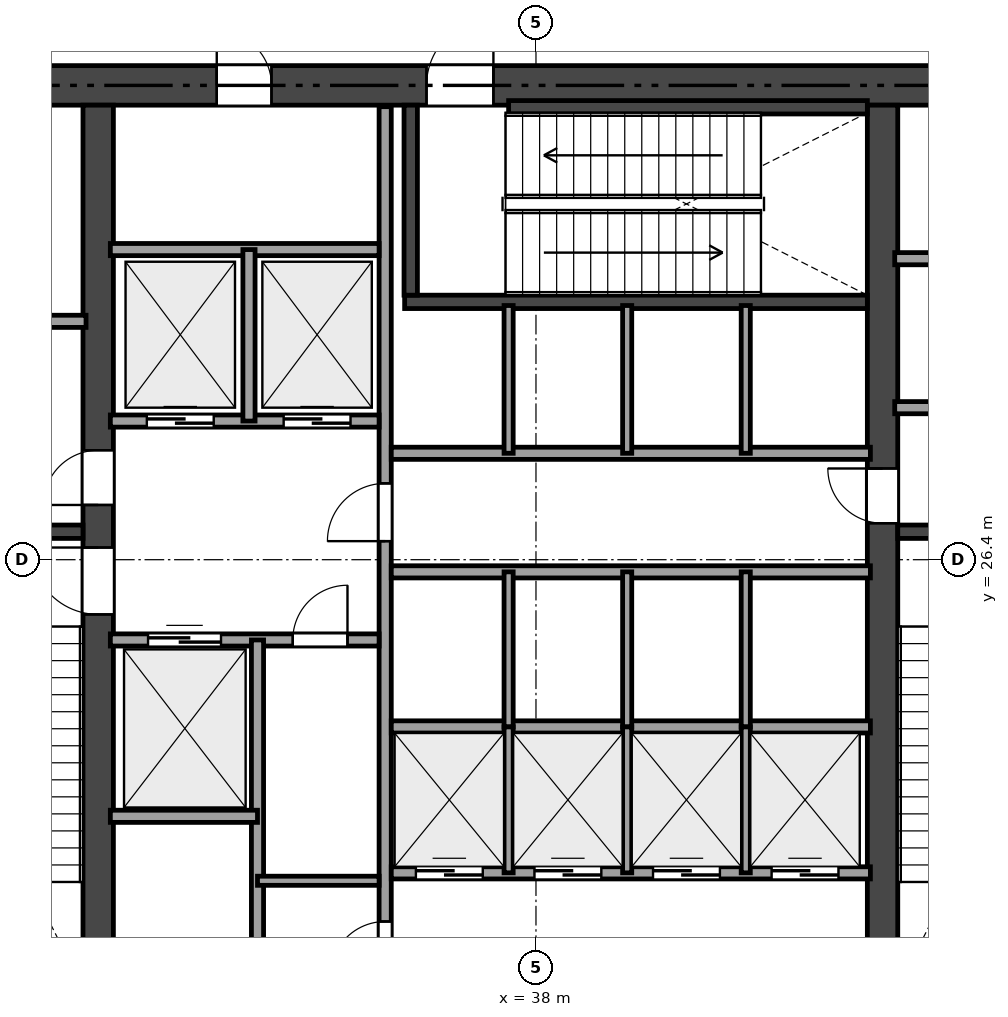
"""IFC4 building model, lengths in metres.
Left out: names, types, materials, properties, quantities, classifications, styles, units other than length and angle.
Written with IfcOpenShell. Run it as: python <this file> out.ifc"""

import sys

from ifc_helpers import new_model, si_unit, direction, frame, frame_2d, origin, place, context, subcontext, project, spatial, rectangle, extrude, element, fill, save


model = new_model("IFC4")
c1 = context("Model", 3, precision=1e-05, world=origin(), true_north=direction((0.0, 1.0)))
c2 = subcontext(c1, "Body", "Model", "MODEL_VIEW")
j1 = project(units=[si_unit("LENGTHUNIT", "METRE"), si_unit("PLANEANGLEUNIT", "RADIAN")], contexts=[c1])
p1 = place(None, origin())
s1 = spatial("IfcSite", under=j1, at=p1, CompositionType="ELEMENT")
p2 = place(p1, origin())
s2 = spatial("IfcBuilding", under=s1, at=p2, CompositionType="ELEMENT")
p3 = place(p2, frame((0.0, 0.0, 5.4)))
s3 = spatial("IfcBuildingStorey", under=s2, at=p3, CompositionType="ELEMENT", Elevation=5.4)
p4 = place(p3, frame((26.475, 34.2, 0.0), z_axis=(0.0, 0.0, 1.0), x_axis=(1.0, 0.0, 0.0)))
e1 = element("IfcWall", 1, at=p4, inside=s3, PredefinedType="SHEAR", context=c2, shape_type="SweptSolid", body=[
    extrude(rectangle(XDim=21.45, YDim=0.65, at=frame_2d((10.725, 0.0))), origin(), (0.0, 0.0, 1.0), 5.05),
])
p5 = place(p4, frame((9.725, 0.0, 0.0)))
e2 = element("IfcOpeningElement", 2, at=p5, cuts=e1, PredefinedType="OPENING", context=c2, shape_type="SweptSolid", body=[
    extrude(rectangle(XDim=1.1, YDim=2.15, at=frame_2d((0.55, 1.075))), frame((0.0, 0.335, 0.0), z_axis=(0.0, -1.0, 0.0), x_axis=(1.0, 0.0, 0.0)), (0.0, 0.0, 1.0), 0.67),
])
p6 = place(p4, frame((1.975, 0.0, 0.0)))
e3 = element("IfcOpeningElement", 3, at=p6, cuts=e1, PredefinedType="OPENING", context=c2, shape_type="SweptSolid", body=[
    extrude(rectangle(XDim=0.9, YDim=2.1, at=frame_2d((0.45, 1.05))), frame((0.0, 0.335, 0.0), z_axis=(0.0, -1.0, 0.0), x_axis=(1.0, 0.0, 0.0)), (0.0, 0.0, 1.0), 0.67),
])
p7 = place(p4, frame((6.275, 0.0, 0.0)))
e4 = element("IfcOpeningElement", 4, at=p7, cuts=e1, PredefinedType="OPENING", context=c2, shape_type="SweptSolid", body=[
    extrude(rectangle(XDim=0.9, YDim=2.1, at=frame_2d((0.45, 1.05))), frame((0.0, 0.335, 0.0), z_axis=(0.0, -1.0, 0.0), x_axis=(1.0, 0.0, 0.0)), (0.0, 0.0, 1.0), 0.67),
])
p8 = place(p3, frame((30.8, 18.925, 0.0), z_axis=(0.0, 0.0, 1.0), x_axis=(0.0, 1.0, 0.0)))
e5 = element("IfcWall", 5, at=p8, inside=s3, PredefinedType="SHEAR", context=c2, shape_type="SweptSolid", body=[
    extrude(rectangle(XDim=14.95, YDim=0.5, at=frame_2d((7.475, 0.0))), origin(), (0.0, 0.0, 1.0), 5.05),
])
p9 = place(p8, frame((6.575, 0.0, 0.0)))
e6 = element("IfcOpeningElement", 6, at=p9, cuts=e5, PredefinedType="OPENING", context=c2, shape_type="SweptSolid", body=[
    extrude(rectangle(XDim=1.1, YDim=2.15, at=frame_2d((0.55, 1.075))), frame((0.0, 0.26, 0.0), z_axis=(0.0, -1.0, 0.0), x_axis=(1.0, 0.0, 0.0)), (0.0, 0.0, 1.0), 0.52),
])
p10 = place(p8, frame((8.375, 0.0, 0.0)))
e7 = element("IfcOpeningElement", 7, at=p10, cuts=e5, PredefinedType="OPENING", context=c2, shape_type="SweptSolid", body=[
    extrude(rectangle(XDim=0.9, YDim=2.1, at=frame_2d((0.45, 1.05))), frame((0.0, 0.26, 0.0), z_axis=(0.0, -1.0, 0.0), x_axis=(1.0, 0.0, 0.0)), (0.0, 0.0, 1.0), 0.52),
])
p11 = place(p3, frame((43.7, 18.925, 0.0), z_axis=(0.0, 0.0, 1.0), x_axis=(0.0, 1.0, 0.0)))
e8 = element("IfcWall", 8, at=p11, inside=s3, PredefinedType="SHEAR", context=c2, shape_type="SweptSolid", body=[
    extrude(rectangle(XDim=14.95, YDim=0.5, at=frame_2d((7.475, 0.0))), origin(), (0.0, 0.0, 1.0), 5.05),
])
p12 = place(p11, frame((8.075, 0.0, 0.0)))
e9 = element("IfcOpeningElement", 9, at=p12, cuts=e8, PredefinedType="OPENING", context=c2, shape_type="SweptSolid", body=[
    extrude(rectangle(XDim=0.9, YDim=2.1, at=frame_2d((0.45, 1.05))), frame((0.0, 0.26, 0.0), z_axis=(0.0, -1.0, 0.0), x_axis=(1.0, 0.0, 0.0)), (0.0, 0.0, 1.0), 0.52),
])
p13 = place(p3, frame((27.125, 26.86, 0.0), z_axis=(0.0, 0.0, 1.0), x_axis=(1.0, 0.0, 0.0)))
e10 = element("IfcWall", 10, at=p13, inside=s3, PredefinedType="SHEAR", context=c2, shape_type="SweptSolid", body=[
    extrude(rectangle(XDim=3.425, YDim=0.22, at=frame_2d((1.712, 0.0))), origin(), (0.0, 0.0, 1.0), 5.05),
])
p14 = place(p3, frame((43.95, 26.86, 0.0), z_axis=(0.0, 0.0, 1.0), x_axis=(1.0, 0.0, 0.0)))
e11 = element("IfcWall", 11, at=p14, inside=s3, PredefinedType="SHEAR", context=c2, shape_type="SweptSolid", body=[
    extrude(rectangle(XDim=3.325, YDim=0.22, at=frame_2d((1.663, 0.0))), origin(), (0.0, 0.0, 1.0), 5.05),
])
p15 = place(p3, frame((35.84, 30.64, 0.0), z_axis=(0.0, 0.0, 1.0), x_axis=(1.0, 0.0, 0.0)))
e12 = element("IfcWall", 12, at=p15, inside=s3, PredefinedType="SHEAR", context=c2, shape_type="SweptSolid", body=[
    extrude(rectangle(XDim=7.61, YDim=0.22, at=frame_2d((3.805, 0.0))), origin(), (0.0, 0.0, 1.0), 5.05),
])
p16 = place(p3, frame((35.94, 30.75, 0.0), z_axis=(0.0, 0.0, 1.0), x_axis=(0.0, 1.0, 0.0)))
e13 = element("IfcWall", 13, at=p16, inside=s3, PredefinedType="SHEAR", context=c2, shape_type="SweptSolid", body=[
    extrude(rectangle(XDim=3.125, YDim=0.22, at=frame_2d((1.562, 0.0))), origin(), (0.0, 0.0, 1.0), 5.05),
])
p17 = place(p3, frame((37.55, 33.84, 0.0), z_axis=(0.0, 0.0, 1.0), x_axis=(1.0, 0.0, 0.0)))
e14 = element("IfcWall", 14, at=p17, inside=s3, PredefinedType="SHEAR", context=c2, shape_type="SweptSolid", body=[
    extrude(rectangle(XDim=5.9, YDim=0.22, at=frame_2d((2.95, 0.0))), origin(), (0.0, 0.0, 1.0), 5.05),
])
p18 = place(p3, frame((27.15, 30.32, 0.0), z_axis=(0.0, 0.0, 1.0), x_axis=(1.0, 0.0, 0.0)))
e15 = element("IfcWall", 15, at=p18, inside=s3, PredefinedType="SOLIDWALL", context=c2, shape_type="SweptSolid", body=[
    extrude(rectangle(XDim=3.45, YDim=0.2, at=frame_2d((1.725, 0.0))), origin(), (0.0, 0.0, 1.0), 5.05),
])
p19 = place(p3, frame((43.9, 28.9, 0.0), z_axis=(0.0, 0.0, 1.0), x_axis=(1.0, 0.0, 0.0)))
e16 = element("IfcWall", 16, at=p19, inside=s3, PredefinedType="SOLIDWALL", context=c2, shape_type="SweptSolid", body=[
    extrude(rectangle(XDim=3.35, YDim=0.2, at=frame_2d((1.675, 0.0))), origin(), (0.0, 0.0, 1.0), 5.05),
])
p20 = place(p19, frame((1.15, 0.0, 0.0)))
e17 = element("IfcOpeningElement", 17, at=p20, cuts=e16, PredefinedType="OPENING", context=c2, shape_type="SweptSolid", body=[
    extrude(rectangle(XDim=0.9, YDim=2.1, at=frame_2d((0.45, 1.05))), frame((0.0, 0.11, 0.0), z_axis=(0.0, -1.0, 0.0), x_axis=(1.0, 0.0, 0.0)), (0.0, 0.0, 1.0), 0.22),
])
p21 = place(p3, frame((43.9, 31.35, 0.0), z_axis=(0.0, 0.0, 1.0), x_axis=(1.0, 0.0, 0.0)))
e18 = element("IfcWall", 18, at=p21, inside=s3, PredefinedType="SOLIDWALL", context=c2, shape_type="SweptSolid", body=[
    extrude(rectangle(XDim=3.35, YDim=0.2, at=frame_2d((1.675, 0.0))), origin(), (0.0, 0.0, 1.0), 5.05),
])
p22 = place(p3, frame((35.52, 18.95, 0.0), z_axis=(0.0, 0.0, 1.0), x_axis=(0.0, 1.0, 0.0)))
e19 = element("IfcWall", 19, at=p22, inside=s3, PredefinedType="SOLIDWALL", context=c2, shape_type="SweptSolid", body=[
    extrude(rectangle(XDim=14.9, YDim=0.2, at=frame_2d((7.45, 0.0))), origin(), (0.0, 0.0, 1.0), 4.571),
])
p23 = place(p22, frame((7.755, 0.0, 0.0)))
e20 = element("IfcOpeningElement", 20, at=p23, cuts=e19, PredefinedType="OPENING", context=c2, shape_type="SweptSolid", body=[
    extrude(rectangle(XDim=0.95, YDim=2.15, at=frame_2d((0.475, 1.075))), frame((0.0, 0.11, 0.0), z_axis=(0.0, -1.0, 0.0), x_axis=(1.0, 0.0, 0.0)), (0.0, 0.0, 1.0), 0.22),
])
p24 = place(p22, frame((0.6, 0.0, 0.0)))
e21 = element("IfcOpeningElement", 21, at=p24, cuts=e19, PredefinedType="OPENING", context=c2, shape_type="SweptSolid", body=[
    extrude(rectangle(XDim=0.9, YDim=2.1, at=frame_2d((0.45, 1.05))), frame((0.0, 0.11, 0.0), z_axis=(0.0, -1.0, 0.0), x_axis=(1.0, 0.0, 0.0)), (0.0, 0.0, 1.0), 0.22),
])
p25 = place(p3, frame((31.0, 28.68, 0.0), z_axis=(0.0, 0.0, 1.0), x_axis=(1.0, 0.0, 0.0)))
e22 = element("IfcWall", 22, at=p25, inside=s3, PredefinedType="SOLIDWALL", context=c2, shape_type="SweptSolid", body=[
    extrude(rectangle(XDim=4.42, YDim=0.2, at=frame_2d((2.21, 0.0))), origin(), (0.0, 0.0, 1.0), 5.05),
])
p26 = place(p25, frame((0.6, 0.0, 0.0)))
e23 = element("IfcOpeningElement", 23, at=p26, cuts=e22, PredefinedType="OPENING", context=c2, shape_type="SweptSolid", body=[
    extrude(rectangle(XDim=1.1, YDim=2.15, at=frame_2d((0.55, 1.075))), frame((0.0, 0.11, 0.0), z_axis=(0.0, -1.0, 0.0), x_axis=(1.0, 0.0, 0.0)), (0.0, 0.0, 1.0), 0.22),
])
p27 = place(p25, frame((2.85, 0.0, 0.0)))
e24 = element("IfcOpeningElement", 24, at=p27, cuts=e22, PredefinedType="OPENING", context=c2, shape_type="SweptSolid", body=[
    extrude(rectangle(XDim=1.1, YDim=2.15, at=frame_2d((0.55, 1.075))), frame((0.0, 0.11, 0.0), z_axis=(0.0, -1.0, 0.0), x_axis=(1.0, 0.0, 0.0)), (0.0, 0.0, 1.0), 0.22),
])
p28 = place(p3, frame((31.0, 31.5, 0.0), z_axis=(0.0, 0.0, 1.0), x_axis=(1.0, 0.0, 0.0)))
e25 = element("IfcWall", 25, at=p28, inside=s3, PredefinedType="SOLIDWALL", context=c2, shape_type="SweptSolid", body=[
    extrude(rectangle(XDim=4.42, YDim=0.2, at=frame_2d((2.21, 0.0))), origin(), (0.0, 0.0, 1.0), 5.05),
])
p29 = place(p3, frame((33.28, 28.68, 0.0), z_axis=(0.0, 0.0, 1.0), x_axis=(0.0, 1.0, 0.0)))
e26 = element("IfcWall", 26, at=p29, inside=s3, PredefinedType="SOLIDWALL", context=c2, shape_type="SweptSolid", body=[
    extrude(rectangle(XDim=2.82, YDim=0.2, at=frame_2d((1.41, 0.0))), origin(), (0.0, 0.0, 1.0), 5.05),
])
p30 = place(p3, frame((31.0, 25.08, 0.0), z_axis=(0.0, 0.0, 1.0), x_axis=(1.0, 0.0, 0.0)))
e27 = element("IfcWall", 27, at=p30, inside=s3, PredefinedType="SOLIDWALL", context=c2, shape_type="SweptSolid", body=[
    extrude(rectangle(XDim=4.42, YDim=0.2, at=frame_2d((2.21, 0.0))), origin(), (0.0, 0.0, 1.0), 5.05),
])
p31 = place(p30, frame((3.0, 0.0, 0.0)))
e28 = element("IfcOpeningElement", 28, at=p31, cuts=e27, PredefinedType="OPENING", context=c2, shape_type="SweptSolid", body=[
    extrude(rectangle(XDim=0.9, YDim=2.1, at=frame_2d((0.45, 1.05))), frame((0.0, 0.11, 0.0), z_axis=(0.0, -1.0, 0.0), x_axis=(1.0, 0.0, 0.0)), (0.0, 0.0, 1.0), 0.22),
])
p32 = place(p30, frame((0.62, 0.0, 0.0)))
e29 = element("IfcOpeningElement", 29, at=p32, cuts=e27, PredefinedType="OPENING", context=c2, shape_type="SweptSolid", body=[
    extrude(rectangle(XDim=1.2, YDim=2.15, at=frame_2d((0.6, 1.075))), frame((0.0, 0.11, 0.0), z_axis=(0.0, -1.0, 0.0), x_axis=(1.0, 0.0, 0.0)), (0.0, 0.0, 1.0), 0.22),
])
p33 = place(p3, frame((33.42, 18.95, 0.0), z_axis=(0.0, 0.0, 1.0), x_axis=(0.0, 1.0, 0.0)))
e30 = element("IfcWall", 30, at=p33, inside=s3, PredefinedType="SOLIDWALL", context=c2, shape_type="SweptSolid", body=[
    extrude(rectangle(XDim=6.13, YDim=0.2, at=frame_2d((3.065, 0.0))), origin(), (0.0, 0.0, 1.0), 4.571),
])
p34 = place(p3, frame((31.0, 22.18, 0.0), z_axis=(0.0, 0.0, 1.0), x_axis=(1.0, 0.0, 0.0)))
e31 = element("IfcWall", 31, at=p34, inside=s3, PredefinedType="SOLIDWALL", context=c2, shape_type="SweptSolid", body=[
    extrude(rectangle(XDim=2.42, YDim=0.2, at=frame_2d((1.21, 0.0))), origin(), (0.0, 0.0, 1.0), 5.05),
])
p35 = place(p3, frame((33.42, 21.12, 0.0), z_axis=(0.0, 0.0, 1.0), x_axis=(1.0, 0.0, 0.0)))
e32 = element("IfcWall", 32, at=p35, inside=s3, PredefinedType="PARTITIONING", context=c2, shape_type="SweptSolid", body=[
    extrude(rectangle(XDim=2.0, YDim=0.15, at=frame_2d((1.0, 0.0))), origin(), (0.0, 0.0, 1.0), 5.05),
])
for number, where, z_axis, x_axis in (
    (33, (35.62, 28.15, 0.0), (0.0, 0.0, 1.0), (1.0, 0.0, 0.0)),
    (34, (35.62, 26.2, 0.0), (0.0, 0.0, 1.0), (1.0, 0.0, 0.0)),
):
    element("IfcWall", number, at=place(p3, frame(where, z_axis=z_axis, x_axis=x_axis)), inside=s3, PredefinedType="SOLIDWALL", context=c2, shape_type="SweptSolid", body=[
        extrude(rectangle(XDim=7.88, YDim=0.2, at=frame_2d((3.94, 0.0))), origin(), (0.0, 0.0, 1.0), 5.05),
    ])
p36 = place(p3, frame((35.62, 23.65, 0.0), z_axis=(0.0, 0.0, 1.0), x_axis=(1.0, 0.0, 0.0)))
e35 = element("IfcWall", 35, at=p36, inside=s3, PredefinedType="SOLIDWALL", context=c2, shape_type="SweptSolid", body=[
    extrude(rectangle(XDim=7.88, YDim=0.2, at=frame_2d((3.94, 0.0))), origin(), (0.0, 0.0, 1.0), 4.571),
])
p37 = place(p3, frame((35.62, 21.25, 0.0), z_axis=(0.0, 0.0, 1.0), x_axis=(1.0, 0.0, 0.0)))
e36 = element("IfcWall", 36, at=p37, inside=s3, PredefinedType="SOLIDWALL", context=c2, shape_type="SweptSolid", body=[
    extrude(rectangle(XDim=7.88, YDim=0.2, at=frame_2d((3.94, 0.0))), origin(), (0.0, 0.0, 1.0), 5.05),
])
p38 = place(p37, frame((0.405, 0.0, 0.0)))
e37 = element("IfcOpeningElement", 37, at=p38, cuts=e36, PredefinedType="OPENING", context=c2, shape_type="SweptSolid", body=[
    extrude(rectangle(XDim=1.1, YDim=2.15, at=frame_2d((0.55, 1.075))), frame((0.0, 0.11, 0.0), z_axis=(0.0, -1.0, 0.0), x_axis=(1.0, 0.0, 0.0)), (0.0, 0.0, 1.0), 0.22),
])
p39 = place(p37, frame((2.355, 0.0, 0.0)))
e38 = element("IfcOpeningElement", 38, at=p39, cuts=e36, PredefinedType="OPENING", context=c2, shape_type="SweptSolid", body=[
    extrude(rectangle(XDim=1.1, YDim=2.15, at=frame_2d((0.55, 1.075))), frame((0.0, 0.11, 0.0), z_axis=(0.0, -1.0, 0.0), x_axis=(1.0, 0.0, 0.0)), (0.0, 0.0, 1.0), 0.22),
])
p40 = place(p37, frame((4.305, 0.0, 0.0)))
e39 = element("IfcOpeningElement", 39, at=p40, cuts=e36, PredefinedType="OPENING", context=c2, shape_type="SweptSolid", body=[
    extrude(rectangle(XDim=1.1, YDim=2.15, at=frame_2d((0.55, 1.075))), frame((0.0, 0.11, 0.0), z_axis=(0.0, -1.0, 0.0), x_axis=(1.0, 0.0, 0.0)), (0.0, 0.0, 1.0), 0.22),
])
p41 = place(p37, frame((6.255, 0.0, 0.0)))
e40 = element("IfcOpeningElement", 40, at=p41, cuts=e36, PredefinedType="OPENING", context=c2, shape_type="SweptSolid", body=[
    extrude(rectangle(XDim=1.1, YDim=2.15, at=frame_2d((0.55, 1.075))), frame((0.0, 0.11, 0.0), z_axis=(0.0, -1.0, 0.0), x_axis=(1.0, 0.0, 0.0)), (0.0, 0.0, 1.0), 0.22),
])
for number, where, z_axis, x_axis in (
    (41, (37.55, 28.15, 0.0), (0.0, 0.0, 1.0), (0.0, 1.0, 0.0)),
    (42, (39.5, 28.15, 0.0), (0.0, 0.0, 1.0), (0.0, 1.0, 0.0)),
    (43, (41.45, 28.15, 0.0), (0.0, 0.0, 1.0), (0.0, 1.0, 0.0)),
):
    element("IfcWall", number, at=place(p3, frame(where, z_axis=z_axis, x_axis=x_axis)), inside=s3, PredefinedType="PARTITIONING", context=c2, shape_type="SweptSolid", body=[
        extrude(rectangle(XDim=2.43, YDim=0.15, at=frame_2d((1.215, 0.0))), origin(), (0.0, 0.0, 1.0), 5.05),
    ])
for number, where, z_axis, x_axis in (
    (44, (37.55, 23.65, 0.0), (0.0, 0.0, 1.0), (0.0, 1.0, 0.0)),
    (45, (39.5, 23.65, 0.0), (0.0, 0.0, 1.0), (0.0, 1.0, 0.0)),
    (46, (41.45, 23.65, 0.0), (0.0, 0.0, 1.0), (0.0, 1.0, 0.0)),
):
    element("IfcWall", number, at=place(p3, frame(where, z_axis=z_axis, x_axis=x_axis)), inside=s3, PredefinedType="PARTITIONING", context=c2, shape_type="SweptSolid", body=[
        extrude(rectangle(XDim=2.55, YDim=0.15, at=frame_2d((1.275, 0.0))), origin(), (0.0, 0.0, 1.0), 4.571),
    ])
for number, where, z_axis, x_axis in (
    (47, (37.55, 21.25, 0.0), (0.0, 0.0, 1.0), (0.0, 1.0, 0.0)),
    (48, (39.5, 21.25, 0.0), (0.0, 0.0, 1.0), (0.0, 1.0, 0.0)),
    (49, (41.45, 21.25, 0.0), (0.0, 0.0, 1.0), (0.0, 1.0, 0.0)),
):
    element("IfcWall", number, at=place(p3, frame(where, z_axis=z_axis, x_axis=x_axis)), inside=s3, PredefinedType="PARTITIONING", context=c2, shape_type="SweptSolid", body=[
        extrude(rectangle(XDim=2.4, YDim=0.15, at=frame_2d((1.2, 0.0))), origin(), (0.0, 0.0, 1.0), 4.571),
    ])
p42 = place(p9, origin())
e50 = element("IfcDoor", 50, at=p42, inside=s3, OperationType="SINGLE_SWING_RIGHT", PredefinedType="DOOR", context=c2, shape_type="SweptSolid", body=[
    extrude(rectangle(XDim=1.1, YDim=2.15, at=frame_2d((0.55, 1.075))), frame((0.0, 0.025, 0.0), z_axis=(0.0, -1.0, 0.0), x_axis=(1.0, 0.0, 0.0)), (0.0, 0.0, 1.0), 0.05),
])
fill(e6, e50)
p43 = place(p5, origin())
e51 = element("IfcDoor", 51, at=p43, inside=s3, OperationType="SINGLE_SWING_RIGHT", PredefinedType="DOOR", context=c2, shape_type="SweptSolid", body=[
    extrude(rectangle(XDim=1.1, YDim=2.15, at=frame_2d((0.55, 1.075))), frame((0.0, 0.025, 0.0), z_axis=(0.0, -1.0, 0.0), x_axis=(1.0, 0.0, 0.0)), (0.0, 0.0, 1.0), 0.05),
])
fill(e2, e51)
p44 = place(p23, origin())
e52 = element("IfcDoor", 52, at=p44, inside=s3, OperationType="SINGLE_SWING_LEFT", PredefinedType="DOOR", context=c2, shape_type="SweptSolid", body=[
    extrude(rectangle(XDim=0.95, YDim=2.15, at=frame_2d((0.475, 1.075))), frame((0.0, 0.025, 0.0), z_axis=(0.0, -1.0, 0.0), x_axis=(1.0, 0.0, 0.0)), (0.0, 0.0, 1.0), 0.05),
])
fill(e20, e52)
p45 = place(p12, origin())
e53 = element("IfcDoor", 53, at=p45, inside=s3, OperationType="SINGLE_SWING_RIGHT", PredefinedType="DOOR", context=c2, shape_type="SweptSolid", body=[
    extrude(rectangle(XDim=0.9, YDim=2.1, at=frame_2d((0.45, 1.05))), frame((0.0, 0.025, 0.0), z_axis=(0.0, -1.0, 0.0), x_axis=(1.0, 0.0, 0.0)), (0.0, 0.0, 1.0), 0.05),
])
fill(e9, e53)
p46 = place(p10, origin())
e54 = element("IfcDoor", 54, at=p46, inside=s3, OperationType="SINGLE_SWING_LEFT", PredefinedType="DOOR", context=c2, shape_type="SweptSolid", body=[
    extrude(rectangle(XDim=0.9, YDim=2.1, at=frame_2d((0.45, 1.05))), frame((0.0, 0.025, 0.0), z_axis=(0.0, -1.0, 0.0), x_axis=(1.0, 0.0, 0.0)), (0.0, 0.0, 1.0), 0.05),
])
fill(e7, e54)
p47 = place(p7, origin())
e55 = element("IfcDoor", 55, at=p47, inside=s3, OperationType="SINGLE_SWING_LEFT", PredefinedType="DOOR", context=c2, shape_type="SweptSolid", body=[
    extrude(rectangle(XDim=0.9, YDim=2.1, at=frame_2d((0.45, 1.05))), frame((0.0, 0.025, 0.0), z_axis=(0.0, -1.0, 0.0), x_axis=(1.0, 0.0, 0.0)), (0.0, 0.0, 1.0), 0.05),
])
fill(e4, e55)
p48 = place(p24, origin())
e56 = element("IfcDoor", 56, at=p48, inside=s3, OperationType="SINGLE_SWING_LEFT", PredefinedType="DOOR", context=c2, shape_type="SweptSolid", body=[
    extrude(rectangle(XDim=0.9, YDim=2.1, at=frame_2d((0.45, 1.05))), frame((0.0, 0.025, 0.0), z_axis=(0.0, -1.0, 0.0), x_axis=(1.0, 0.0, 0.0)), (0.0, 0.0, 1.0), 0.05),
])
fill(e21, e56)
p49 = place(p31, origin())
e57 = element("IfcDoor", 57, at=p49, inside=s3, OperationType="SINGLE_SWING_RIGHT", PredefinedType="DOOR", context=c2, shape_type="SweptSolid", body=[
    extrude(rectangle(XDim=0.9, YDim=2.1, at=frame_2d((0.45, 1.05))), frame((0.0, 0.025, 0.0), z_axis=(0.0, -1.0, 0.0), x_axis=(1.0, 0.0, 0.0)), (0.0, 0.0, 1.0), 0.05),
])
fill(e28, e57)
p50 = place(p26, origin())
e58 = element("IfcDoor", 58, at=p50, inside=s3, OperationType="SLIDING_TO_LEFT", PredefinedType="DOOR", context=c2, shape_type="SweptSolid", body=[
    extrude(rectangle(XDim=1.1, YDim=2.15, at=frame_2d((0.55, 1.075))), frame((0.0, 0.025, 0.0), z_axis=(0.0, -1.0, 0.0), x_axis=(1.0, 0.0, 0.0)), (0.0, 0.0, 1.0), 0.05),
])
fill(e23, e58)
p51 = place(p27, origin())
e59 = element("IfcDoor", 59, at=p51, inside=s3, OperationType="SLIDING_TO_LEFT", PredefinedType="DOOR", context=c2, shape_type="SweptSolid", body=[
    extrude(rectangle(XDim=1.1, YDim=2.15, at=frame_2d((0.55, 1.075))), frame((0.0, 0.025, 0.0), z_axis=(0.0, -1.0, 0.0), x_axis=(1.0, 0.0, 0.0)), (0.0, 0.0, 1.0), 0.05),
])
fill(e24, e59)
p52 = place(p32, origin())
e60 = element("IfcDoor", 60, at=p52, inside=s3, OperationType="SLIDING_TO_LEFT", PredefinedType="DOOR", context=c2, shape_type="SweptSolid", body=[
    extrude(rectangle(XDim=1.2, YDim=2.15, at=frame_2d((0.6, 1.075))), frame((0.0, 0.025, 0.0), z_axis=(0.0, -1.0, 0.0), x_axis=(1.0, 0.0, 0.0)), (0.0, 0.0, 1.0), 0.05),
])
fill(e29, e60)
p53 = place(p38, origin())
e61 = element("IfcDoor", 61, at=p53, inside=s3, OperationType="SLIDING_TO_LEFT", PredefinedType="DOOR", context=c2, shape_type="SweptSolid", body=[
    extrude(rectangle(XDim=1.1, YDim=2.15, at=frame_2d((0.55, 1.075))), frame((0.0, 0.025, 0.0), z_axis=(0.0, -1.0, 0.0), x_axis=(1.0, 0.0, 0.0)), (0.0, 0.0, 1.0), 0.05),
])
fill(e37, e61)
p54 = place(p39, origin())
e62 = element("IfcDoor", 62, at=p54, inside=s3, OperationType="SLIDING_TO_LEFT", PredefinedType="DOOR", context=c2, shape_type="SweptSolid", body=[
    extrude(rectangle(XDim=1.1, YDim=2.15, at=frame_2d((0.55, 1.075))), frame((0.0, 0.025, 0.0), z_axis=(0.0, -1.0, 0.0), x_axis=(1.0, 0.0, 0.0)), (0.0, 0.0, 1.0), 0.05),
])
fill(e38, e62)
p55 = place(p40, origin())
e63 = element("IfcDoor", 63, at=p55, inside=s3, OperationType="SLIDING_TO_LEFT", PredefinedType="DOOR", context=c2, shape_type="SweptSolid", body=[
    extrude(rectangle(XDim=1.1, YDim=2.15, at=frame_2d((0.55, 1.075))), frame((0.0, 0.025, 0.0), z_axis=(0.0, -1.0, 0.0), x_axis=(1.0, 0.0, 0.0)), (0.0, 0.0, 1.0), 0.05),
])
fill(e39, e63)
p56 = place(p41, origin())
e64 = element("IfcDoor", 64, at=p56, inside=s3, OperationType="SLIDING_TO_LEFT", PredefinedType="DOOR", context=c2, shape_type="SweptSolid", body=[
    extrude(rectangle(XDim=1.1, YDim=2.15, at=frame_2d((0.55, 1.075))), frame((0.0, 0.025, 0.0), z_axis=(0.0, -1.0, 0.0), x_axis=(1.0, 0.0, 0.0)), (0.0, 0.0, 1.0), 0.05),
])
fill(e40, e64)
save(model, sys.argv[1])
